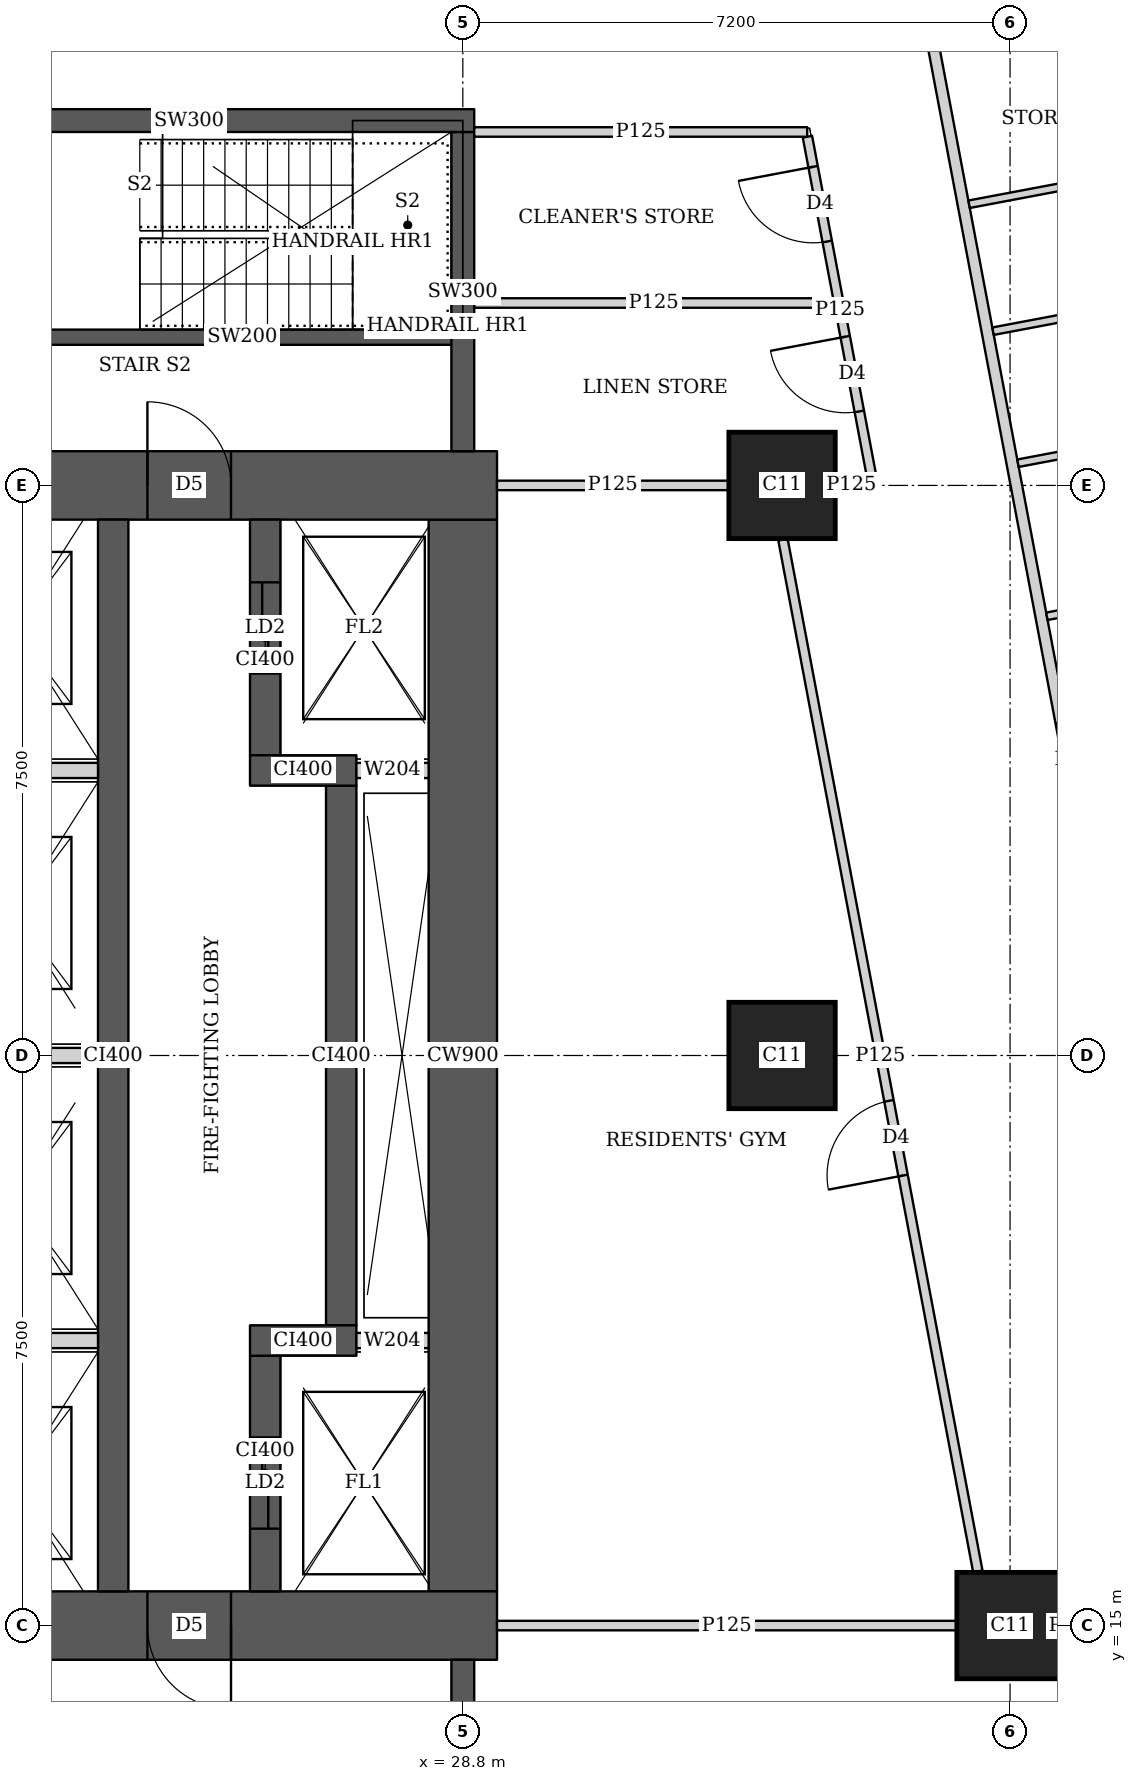
"""IFC4 building model, lengths in metres.
Left out: names, types, materials, properties, quantities, classifications, styles, units other than length and angle.
Written with IfcOpenShell. Run it as: python <this file> out.ifc"""

import sys

from ifc_helpers import new_model, si_unit, direction, frame, frame_2d, origin, origin_2d, place, context, subcontext, project, spatial, rectangle, extrude, element, fill, save


model = new_model("IFC4")
c1 = context("Model", 3, precision=1e-05, world=origin(), true_north=direction((0.0, 1.0)))
c2 = subcontext(c1, "Body", "Model", "MODEL_VIEW")
j1 = project(units=[si_unit("LENGTHUNIT", "METRE"), si_unit("PLANEANGLEUNIT", "RADIAN")], contexts=[c1])
p1 = place(None, origin())
s1 = spatial("IfcSite", under=j1, at=p1, CompositionType="ELEMENT")
p2 = place(p1, origin())
s2 = spatial("IfcBuilding", under=s1, at=p2, CompositionType="ELEMENT")
p3 = place(p2, frame((0.0, 0.0, 223.7)))
s3 = spatial("IfcBuildingStorey", under=s2, at=p3, CompositionType="ELEMENT", Elevation=223.7)
for number, where, z_axis, x_axis in (
    (1, (36.0, 15.0, 0.0), (0.0, 0.0, 1.0), (1.0, 0.0, 0.0)),
    (2, (33.0, 22.5, 0.0), (0.0, 0.0, 1.0), (1.0, 0.0, 0.0)),
    (3, (33.0, 30.0, 0.0), (0.0, 0.0, 1.0), (1.0, 0.0, 0.0)),
):
    element("IfcColumn", number, at=place(p3, frame(where, z_axis=z_axis, x_axis=x_axis)), inside=s3, PredefinedType="COLUMN", context=c2, shape_type="SweptSolid", body=[
        extrude(rectangle(XDim=1.4, YDim=1.4, at=origin_2d()), origin(), (0.0, 0.0, 1.0), 3.75),
    ])
p4 = place(p3, frame((13.95, 15.0, 0.0), z_axis=(0.0, 0.0, 1.0), x_axis=(1.0, 0.0, 0.0)))
e4 = element("IfcWall", 4, at=p4, inside=s3, PredefinedType="SHEAR", context=c2, shape_type="SweptSolid", body=[
    extrude(rectangle(XDim=15.3, YDim=0.9, at=frame_2d((7.65, 0.0))), origin(), (0.0, 0.0, 1.0), 3.75),
])
p5 = place(p4, frame((4.45, 0.0, 0.0)))
e5 = element("IfcOpeningElement", 5, at=p5, cuts=e4, PredefinedType="OPENING", context=c2, shape_type="SweptSolid", body=[
    extrude(rectangle(XDim=1.8, YDim=2.1, at=frame_2d((0.9, 1.05))), frame((0.0, 0.46, 0.0), z_axis=(0.0, -1.0, 0.0), x_axis=(1.0, 0.0, 0.0)), (0.0, 0.0, 1.0), 0.92),
])
p6 = place(p4, frame((10.7, 0.0, 0.0)))
e6 = element("IfcOpeningElement", 6, at=p6, cuts=e4, PredefinedType="OPENING", context=c2, shape_type="SweptSolid", body=[
    extrude(rectangle(XDim=1.1, YDim=2.1, at=frame_2d((0.55, 1.05))), frame((0.0, 0.46, 0.0), z_axis=(0.0, -1.0, 0.0), x_axis=(1.0, 0.0, 0.0)), (0.0, 0.0, 1.0), 0.92),
])
p7 = place(p3, frame((13.95, 30.0, 0.0), z_axis=(0.0, 0.0, 1.0), x_axis=(1.0, 0.0, 0.0)))
e7 = element("IfcWall", 7, at=p7, inside=s3, PredefinedType="SHEAR", context=c2, shape_type="SweptSolid", body=[
    extrude(rectangle(XDim=15.3, YDim=0.9, at=frame_2d((7.65, 0.0))), origin(), (0.0, 0.0, 1.0), 3.75),
])
p8 = place(p7, frame((4.45, 0.0, 0.0)))
e8 = element("IfcOpeningElement", 8, at=p8, cuts=e7, PredefinedType="OPENING", context=c2, shape_type="SweptSolid", body=[
    extrude(rectangle(XDim=1.8, YDim=2.1, at=frame_2d((0.9, 1.05))), frame((0.0, 0.46, 0.0), z_axis=(0.0, -1.0, 0.0), x_axis=(1.0, 0.0, 0.0)), (0.0, 0.0, 1.0), 0.92),
])
p9 = place(p7, frame((10.7, 0.0, 0.0)))
e9 = element("IfcOpeningElement", 9, at=p9, cuts=e7, PredefinedType="OPENING", context=c2, shape_type="SweptSolid", body=[
    extrude(rectangle(XDim=1.1, YDim=2.1, at=frame_2d((0.55, 1.05))), frame((0.0, 0.46, 0.0), z_axis=(0.0, -1.0, 0.0), x_axis=(1.0, 0.0, 0.0)), (0.0, 0.0, 1.0), 0.92),
])
p10 = place(p3, frame((28.8, 15.45, 0.0), z_axis=(0.0, 0.0, 1.0), x_axis=(0.0, 1.0, 0.0)))
e10 = element("IfcWall", 10, at=p10, inside=s3, PredefinedType="SHEAR", context=c2, shape_type="SweptSolid", body=[
    extrude(rectangle(XDim=14.1, YDim=0.9, at=frame_2d((7.05, 0.0))), origin(), (0.0, 0.0, 1.0), 3.75),
])
p11 = place(p3, frame((24.2, 15.45, 0.0), z_axis=(0.0, 0.0, 1.0), x_axis=(0.0, 1.0, 0.0)))
e11 = element("IfcWall", 11, at=p11, inside=s3, PredefinedType="SHEAR", context=c2, shape_type="SweptSolid", body=[
    extrude(rectangle(XDim=14.1, YDim=0.4, at=frame_2d((7.05, 0.0))), origin(), (0.0, 0.0, 1.0), 3.75),
])
p12 = place(p3, frame((26.2, 15.45, 0.0), z_axis=(0.0, 0.0, 1.0), x_axis=(0.0, 1.0, 0.0)))
e12 = element("IfcWall", 12, at=p12, inside=s3, PredefinedType="SHEAR", context=c2, shape_type="SweptSolid", body=[
    extrude(rectangle(XDim=3.1, YDim=0.4, at=frame_2d((1.55, 0.0))), origin(), (0.0, 0.0, 1.0), 3.75),
])
p13 = place(p12, frame((0.825, 0.0, 0.0)))
e13 = element("IfcOpeningElement", 13, at=p13, cuts=e12, PredefinedType="OPENING", context=c2, shape_type="SweptSolid", body=[
    extrude(rectangle(XDim=1.2, YDim=2.1, at=frame_2d((0.6, 1.05))), frame((0.0, 0.21, 0.0), z_axis=(0.0, -1.0, 0.0), x_axis=(1.0, 0.0, 0.0)), (0.0, 0.0, 1.0), 0.42),
])
p14 = place(p3, frame((26.0, 18.75, 0.0), z_axis=(0.0, 0.0, 1.0), x_axis=(1.0, 0.0, 0.0)))
e14 = element("IfcWall", 14, at=p14, inside=s3, PredefinedType="SHEAR", context=c2, shape_type="SweptSolid", body=[
    extrude(rectangle(XDim=1.4, YDim=0.4, at=frame_2d((0.7, 0.0))), origin(), (0.0, 0.0, 1.0), 3.75),
])
p15 = place(p3, frame((27.2, 18.95, 0.0), z_axis=(0.0, 0.0, 1.0), x_axis=(0.0, 1.0, 0.0)))
e15 = element("IfcWall", 15, at=p15, inside=s3, PredefinedType="SHEAR", context=c2, shape_type="SweptSolid", body=[
    extrude(rectangle(XDim=7.1, YDim=0.4, at=frame_2d((3.55, 0.0))), origin(), (0.0, 0.0, 1.0), 3.75),
])
p16 = place(p3, frame((26.0, 26.25, 0.0), z_axis=(0.0, 0.0, 1.0), x_axis=(1.0, 0.0, 0.0)))
e16 = element("IfcWall", 16, at=p16, inside=s3, PredefinedType="SHEAR", context=c2, shape_type="SweptSolid", body=[
    extrude(rectangle(XDim=1.4, YDim=0.4, at=frame_2d((0.7, 0.0))), origin(), (0.0, 0.0, 1.0), 3.75),
])
p17 = place(p3, frame((26.2, 26.45, 0.0), z_axis=(0.0, 0.0, 1.0), x_axis=(0.0, 1.0, 0.0)))
e17 = element("IfcWall", 17, at=p17, inside=s3, PredefinedType="SHEAR", context=c2, shape_type="SweptSolid", body=[
    extrude(rectangle(XDim=3.1, YDim=0.4, at=frame_2d((1.55, 0.0))), origin(), (0.0, 0.0, 1.0), 3.75),
])
p18 = place(p17, frame((1.075, 0.0, 0.0)))
e18 = element("IfcOpeningElement", 18, at=p18, cuts=e17, PredefinedType="OPENING", context=c2, shape_type="SweptSolid", body=[
    extrude(rectangle(XDim=1.2, YDim=2.1, at=frame_2d((0.6, 1.05))), frame((0.0, 0.21, 0.0), z_axis=(0.0, -1.0, 0.0), x_axis=(1.0, 0.0, 0.0)), (0.0, 0.0, 1.0), 0.42),
])
p19 = place(p3, frame((28.8, 10.35, 0.0), z_axis=(0.0, 0.0, 1.0), x_axis=(0.0, 1.0, 0.0)))
e19 = element("IfcWall", 19, at=p19, inside=s3, PredefinedType="SHEAR", context=c2, shape_type="SweptSolid", body=[
    extrude(rectangle(XDim=4.2, YDim=0.3, at=frame_2d((2.1, 0.0))), origin(), (0.0, 0.0, 1.0), 3.75),
])
p20 = place(p3, frame((21.45, 34.8, 0.0), z_axis=(0.0, 0.0, 1.0), x_axis=(1.0, 0.0, 0.0)))
e20 = element("IfcWall", 20, at=p20, inside=s3, PredefinedType="SHEAR", context=c2, shape_type="SweptSolid", body=[
    extrude(rectangle(XDim=7.5, YDim=0.3, at=frame_2d((3.75, 0.0))), origin(), (0.0, 0.0, 1.0), 3.75),
])
p21 = place(p20, frame((0.5, 0.0, 0.0)))
e21 = element("IfcOpeningElement", 21, at=p21, cuts=e20, PredefinedType="OPENING", context=c2, shape_type="SweptSolid", body=[
    extrude(rectangle(XDim=1.1, YDim=2.1, at=frame_2d((0.55, 1.05))), frame((0.0, 0.16, 0.0), z_axis=(0.0, -1.0, 0.0), x_axis=(1.0, 0.0, 0.0)), (0.0, 0.0, 1.0), 0.32),
])
p22 = place(p3, frame((28.8, 30.45, 0.0), z_axis=(0.0, 0.0, 1.0), x_axis=(0.0, 1.0, 0.0)))
e22 = element("IfcWall", 22, at=p22, inside=s3, PredefinedType="SHEAR", context=c2, shape_type="SweptSolid", body=[
    extrude(rectangle(XDim=4.2, YDim=0.3, at=frame_2d((2.1, 0.0))), origin(), (0.0, 0.0, 1.0), 3.75),
])
p23 = place(p3, frame((33.68, 42.723, 0.0), z_axis=(0.0, 0.0, 1.0), x_axis=(0.185601160014, -0.982625162207, 0.0)))
e23 = element("IfcWall", 23, at=p23, inside=s3, PredefinedType="SOLIDWALL", context=c2, shape_type="SweptSolid", body=[
    extrude(rectangle(XDim=41.051, YDim=0.15, at=frame_2d((20.526, 0.0))), origin(), (0.0, 0.0, 1.0), 2.5),
])
p24 = place(p23, frame((16.123, 0.0, 0.0)))
e24 = element("IfcOpeningElement", 24, at=p24, cuts=e23, PredefinedType="OPENING", context=c2, shape_type="SweptSolid", body=[
    extrude(rectangle(XDim=1.0, YDim=2.1, at=frame_2d((0.5, 1.05))), frame((0.0, 0.085, 0.0), z_axis=(0.0, -1.0, 0.0), x_axis=(1.0, 0.0, 0.0)), (0.0, 0.0, 1.0), 0.17),
])
p25 = place(p23, frame((19.938, 0.0, 0.0)))
e25 = element("IfcOpeningElement", 25, at=p25, cuts=e23, PredefinedType="OPENING", context=c2, shape_type="SweptSolid", body=[
    extrude(rectangle(XDim=1.0, YDim=2.1, at=frame_2d((0.5, 1.05))), frame((0.0, 0.085, 0.0), z_axis=(0.0, -1.0, 0.0), x_axis=(1.0, 0.0, 0.0)), (0.0, 0.0, 1.0), 0.17),
])
p26 = place(p23, frame((30.902, 0.0, 0.0)))
e26 = element("IfcOpeningElement", 26, at=p26, cuts=e23, PredefinedType="OPENING", context=c2, shape_type="SweptSolid", body=[
    extrude(rectangle(XDim=1.0, YDim=2.1, at=frame_2d((0.5, 1.05))), frame((0.0, 0.085, 0.0), z_axis=(0.0, -1.0, 0.0), x_axis=(1.0, 0.0, 0.0)), (0.0, 0.0, 1.0), 0.17),
])
p27 = place(p3, frame((39.24, 32.683, 0.0), z_axis=(0.0, 0.0, 1.0), x_axis=(-0.982638553676, -0.185530247748, 0.0)))
e27 = element("IfcWall", 27, at=p27, inside=s3, PredefinedType="PARTITIONING", context=c2, shape_type="SweptSolid", body=[
    extrude(rectangle(XDim=3.525, YDim=0.1, at=frame_2d((1.763, 0.0))), origin(), (0.0, 0.0, 1.0), 3.5),
])
p28 = place(p3, frame((39.997, 28.942, 0.0), z_axis=(0.0, 0.0, 1.0), x_axis=(-0.982613029841, -0.185665380691, 0.0)))
e28 = element("IfcWall", 28, at=p28, inside=s3, PredefinedType="PARTITIONING", context=c2, shape_type="SweptSolid", body=[
    extrude(rectangle(XDim=3.575, YDim=0.1, at=frame_2d((1.788, 0.0))), origin(), (0.0, 0.0, 1.0), 3.5),
])
p29 = place(p3, frame((39.567, 30.947, 0.0), z_axis=(0.0, 0.0, 1.0), x_axis=(-0.982576058723, -0.185860939478, 0.0)))
e29 = element("IfcWall", 29, at=p29, inside=s3, PredefinedType="PARTITIONING", context=c2, shape_type="SweptSolid", body=[
    extrude(rectangle(XDim=3.524, YDim=0.1, at=frame_2d((1.762, 0.0))), origin(), (0.0, 0.0, 1.0), 2.5),
])
p30 = place(p3, frame((38.924, 34.353, 0.0), z_axis=(0.0, 0.0, 1.0), x_axis=(-0.982629014545, -0.18558076348, 0.0)))
e30 = element("IfcWall", 30, at=p30, inside=s3, PredefinedType="PARTITIONING", context=c2, shape_type="SweptSolid", body=[
    extrude(rectangle(XDim=3.524, YDim=0.1, at=frame_2d((1.762, 0.0))), origin(), (0.0, 0.0, 1.0), 3.5),
])
p31 = place(p3, frame((28.95, 34.65, 0.0), z_axis=(0.0, 0.0, 1.0), x_axis=(1.0, 0.0, 0.0)))
e31 = element("IfcWall", 31, at=p31, inside=s3, PredefinedType="PARTITIONING", context=c2, shape_type="SweptSolid", body=[
    extrude(rectangle(XDim=4.381, YDim=0.125, at=frame_2d((2.19, 0.0))), origin(), (0.0, 0.0, 1.0), 3.5),
])
p32 = place(p3, frame((34.193, 30.04, 0.0), z_axis=(0.0, 0.0, 1.0), x_axis=(-0.185626015863, 0.982620467034, 0.0)))
e32 = element("IfcWall", 32, at=p32, inside=s3, PredefinedType="PARTITIONING", context=c2, shape_type="SweptSolid", body=[
    extrude(rectangle(XDim=4.628, YDim=0.125, at=frame_2d((2.314, 0.0))), origin(), (0.0, 0.0, 1.0), 2.5),
])
p33 = place(p32, frame((0.95, 0.0, 0.0)))
e33 = element("IfcOpeningElement", 33, at=p33, cuts=e32, PredefinedType="OPENING", context=c2, shape_type="SweptSolid", body=[
    extrude(rectangle(XDim=1.0, YDim=2.1, at=frame_2d((0.5, 1.05))), frame((0.0, 0.073, 0.0), z_axis=(0.0, -1.0, 0.0), x_axis=(1.0, 0.0, 0.0)), (0.0, 0.0, 1.0), 0.145),
])
p34 = place(p32, frame((3.225, 0.0, 0.0)))
e34 = element("IfcOpeningElement", 34, at=p34, cuts=e32, PredefinedType="OPENING", context=c2, shape_type="SweptSolid", body=[
    extrude(rectangle(XDim=1.0, YDim=2.1, at=frame_2d((0.5, 1.05))), frame((0.0, 0.073, 0.0), z_axis=(0.0, -1.0, 0.0), x_axis=(1.0, 0.0, 0.0)), (0.0, 0.0, 1.0), 0.145),
])
p35 = place(p3, frame((35.576, 15.713, 0.0), z_axis=(0.0, 0.0, 1.0), x_axis=(-0.185602982696, 0.982624817931, 0.0)))
e35 = element("IfcWall", 35, at=p35, inside=s3, PredefinedType="PARTITIONING", context=c2, shape_type="SweptSolid", body=[
    extrude(rectangle(XDim=13.814, YDim=0.125, at=frame_2d((6.907, 0.0))), origin(), (0.0, 0.0, 1.0), 2.5),
])
p36 = place(p35, frame((5.3, 0.0, 0.0)))
e36 = element("IfcOpeningElement", 36, at=p36, cuts=e35, PredefinedType="OPENING", context=c2, shape_type="SweptSolid", body=[
    extrude(rectangle(XDim=1.0, YDim=2.1, at=frame_2d((0.5, 1.05))), frame((0.0, 0.073, 0.0), z_axis=(0.0, -1.0, 0.0), x_axis=(1.0, 0.0, 0.0)), (0.0, 0.0, 1.0), 0.145),
])
p37 = place(p3, frame((29.25, 15.0, 0.0), z_axis=(0.0, 0.0, 1.0), x_axis=(1.0, 0.0, 0.0)))
e37 = element("IfcWall", 37, at=p37, inside=s3, PredefinedType="PARTITIONING", context=c2, shape_type="SweptSolid", body=[
    extrude(rectangle(XDim=6.049, YDim=0.125, at=frame_2d((3.024, 0.0))), origin(), (0.0, 0.0, 1.0), 3.5),
])
p38 = place(p3, frame((29.25, 30.0, 0.0), z_axis=(0.0, 0.0, 1.0), x_axis=(1.0, 0.0, 0.0)))
e38 = element("IfcWall", 38, at=p38, inside=s3, PredefinedType="PARTITIONING", context=c2, shape_type="SweptSolid", body=[
    extrude(rectangle(XDim=3.049, YDim=0.125, at=frame_2d((1.524, 0.0))), origin(), (0.0, 0.0, 1.0), 3.5),
])
p39 = place(p3, frame((33.701, 30.0, 0.0), z_axis=(0.0, 0.0, 1.0), x_axis=(1.0, 0.0, 0.0)))
e39 = element("IfcWall", 39, at=p39, inside=s3, PredefinedType="PARTITIONING", context=c2, shape_type="SweptSolid", body=[
    extrude(rectangle(XDim=0.424, YDim=0.125, at=frame_2d((0.212, 0.0))), origin(), (0.0, 0.0, 1.0), 2.5),
])
p40 = place(p3, frame((28.95, 32.4, 0.0), z_axis=(0.0, 0.0, 1.0), x_axis=(1.0, 0.0, 0.0)))
e40 = element("IfcWall", 40, at=p40, inside=s3, PredefinedType="PARTITIONING", context=c2, shape_type="SweptSolid", body=[
    extrude(rectangle(XDim=4.722, YDim=0.125, at=frame_2d((2.361, 0.0))), origin(), (0.0, 0.0, 1.0), 3.5),
])
p41 = place(p3, frame((23.0, 31.95, 0.0), z_axis=(0.0, 0.0, 1.0), x_axis=(1.0, 0.0, 0.0)))
e41 = element("IfcWall", 41, at=p41, inside=s3, PredefinedType="SHEAR", context=c2, shape_type="SweptSolid", body=[
    extrude(rectangle(XDim=5.8, YDim=0.2, at=frame_2d((2.9, 0.0))), origin(), (0.0, 0.0, 1.0), 3.75),
])
for number, where, z_axis, x_axis in (
    (42, (21.8, 18.75, 0.0), (0.0, 0.0, 1.0), (1.0, 0.0, 0.0)),
    (43, (21.8, 22.5, 0.0), (0.0, 0.0, 1.0), (1.0, 0.0, 0.0)),
    (44, (21.8, 26.25, 0.0), (0.0, 0.0, 1.0), (1.0, 0.0, 0.0)),
):
    element("IfcWall", number, at=place(p3, frame(where, z_axis=z_axis, x_axis=x_axis)), inside=s3, PredefinedType="SOLIDWALL", context=c2, shape_type="SweptSolid", body=[
        extrude(rectangle(XDim=2.2, YDim=0.2, at=frame_2d((1.1, 0.0))), origin(), (0.0, 0.0, 1.0), 3.5),
    ])
for number, where, z_axis, x_axis in (
    (45, (27.4, 18.75, 0.0), (0.0, 0.0, 1.0), (1.0, 0.0, 0.0)),
    (46, (27.4, 26.25, 0.0), (0.0, 0.0, 1.0), (1.0, 0.0, 0.0)),
):
    element("IfcWall", number, at=place(p3, frame(where, z_axis=z_axis, x_axis=x_axis)), inside=s3, PredefinedType="SOLIDWALL", context=c2, shape_type="SweptSolid", body=[
        extrude(rectangle(XDim=0.95, YDim=0.2, at=frame_2d((0.475, 0.0))), origin(), (0.0, 0.0, 1.0), 3.5),
    ])
p42 = place(p36, origin())
e47 = element("IfcDoor", 47, at=p42, inside=s3, OperationType="SINGLE_SWING_LEFT", PredefinedType="DOOR", context=c2, shape_type="SweptSolid", body=[
    extrude(rectangle(XDim=1.0, YDim=2.1, at=frame_2d((0.5, 1.05))), frame((0.0, 0.025, 0.0), z_axis=(0.0, -1.0, 0.0), x_axis=(1.0, 0.0, 0.0)), (0.0, 0.0, 1.0), 0.05),
])
fill(e36, e47)
p43 = place(p33, origin())
e48 = element("IfcDoor", 48, at=p43, inside=s3, OperationType="SINGLE_SWING_RIGHT", PredefinedType="DOOR", context=c2, shape_type="SweptSolid", body=[
    extrude(rectangle(XDim=1.0, YDim=2.1, at=frame_2d((0.5, 1.05))), frame((0.0, 0.025, 0.0), z_axis=(0.0, -1.0, 0.0), x_axis=(1.0, 0.0, 0.0)), (0.0, 0.0, 1.0), 0.05),
])
fill(e33, e48)
p44 = place(p34, origin())
e49 = element("IfcDoor", 49, at=p44, inside=s3, OperationType="SINGLE_SWING_RIGHT", PredefinedType="DOOR", context=c2, shape_type="SweptSolid", body=[
    extrude(rectangle(XDim=1.0, YDim=2.1, at=frame_2d((0.5, 1.05))), frame((0.0, 0.025, 0.0), z_axis=(0.0, -1.0, 0.0), x_axis=(1.0, 0.0, 0.0)), (0.0, 0.0, 1.0), 0.05),
])
fill(e34, e49)
p45 = place(p6, origin())
e50 = element("IfcDoor", 50, at=p45, inside=s3, OperationType="SINGLE_SWING_LEFT", PredefinedType="DOOR", context=c2, shape_type="SweptSolid", body=[
    extrude(rectangle(XDim=1.1, YDim=2.1, at=frame_2d((0.55, 1.05))), frame((0.0, 0.025, 0.0), z_axis=(0.0, -1.0, 0.0), x_axis=(1.0, 0.0, 0.0)), (0.0, 0.0, 1.0), 0.05),
])
fill(e6, e50)
p46 = place(p9, origin())
e51 = element("IfcDoor", 51, at=p46, inside=s3, OperationType="SINGLE_SWING_LEFT", PredefinedType="DOOR", context=c2, shape_type="SweptSolid", body=[
    extrude(rectangle(XDim=1.1, YDim=2.1, at=frame_2d((0.55, 1.05))), frame((0.0, 0.025, 0.0), z_axis=(0.0, -1.0, 0.0), x_axis=(1.0, 0.0, 0.0)), (0.0, 0.0, 1.0), 0.05),
])
fill(e9, e51)
p47 = place(p13, origin())
e52 = element("IfcDoor", 52, at=p47, inside=s3, OperationType="DOUBLE_DOOR_SLIDING", PredefinedType="DOOR", context=c2, shape_type="SweptSolid", body=[
    extrude(rectangle(XDim=1.2, YDim=2.1, at=frame_2d((0.6, 1.05))), frame((0.0, 0.025, 0.0), z_axis=(0.0, -1.0, 0.0), x_axis=(1.0, 0.0, 0.0)), (0.0, 0.0, 1.0), 0.05),
])
fill(e13, e52)
p48 = place(p18, origin())
e53 = element("IfcDoor", 53, at=p48, inside=s3, OperationType="DOUBLE_DOOR_SLIDING", PredefinedType="DOOR", context=c2, shape_type="SweptSolid", body=[
    extrude(rectangle(XDim=1.2, YDim=2.1, at=frame_2d((0.6, 1.05))), frame((0.0, 0.025, 0.0), z_axis=(0.0, -1.0, 0.0), x_axis=(1.0, 0.0, 0.0)), (0.0, 0.0, 1.0), 0.05),
])
fill(e18, e53)
save(model, sys.argv[1])
